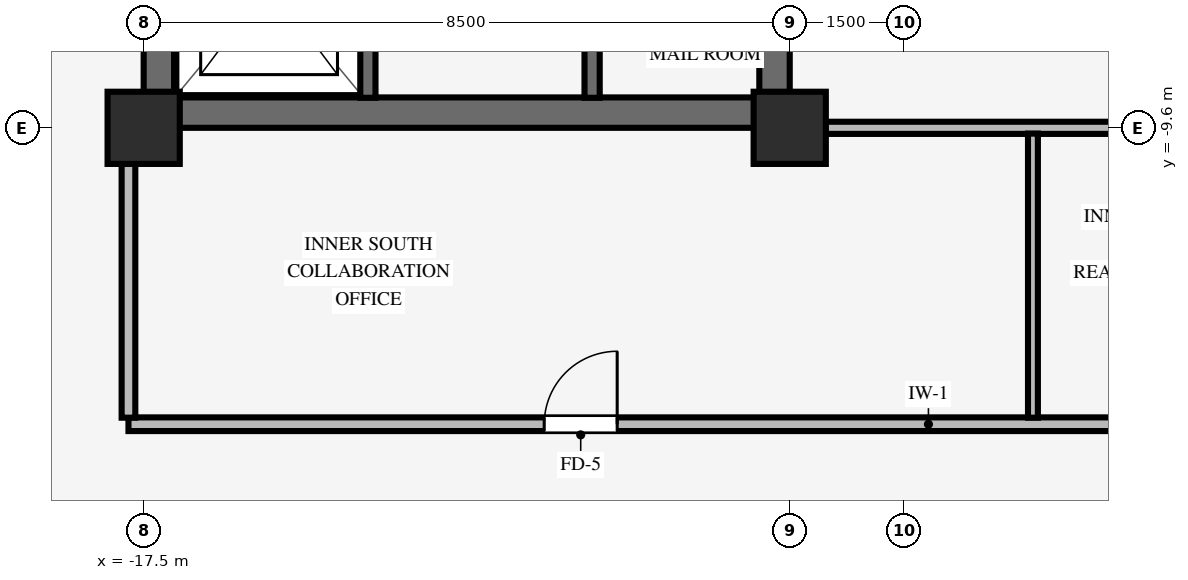
"""IFC4 building model, lengths in metres.
Left out: names, types, materials, properties, quantities, classifications, styles, units other than length and angle.
Written with IfcOpenShell. Run it as: python <this file> out.ifc"""

import sys

from ifc_helpers import new_model, si_unit, direction, frame, frame_2d, origin, origin_2d, place, context, subcontext, project, spatial, rectangle, extrude, source, transform, mapped, element, fill, save


model = new_model("IFC4")
c1 = context("Model", 3, precision=1e-05, world=origin(), true_north=direction((0.0, 1.0)))
c2 = subcontext(c1, "Body", "Model", "MODEL_VIEW")
j1 = project(units=[si_unit("LENGTHUNIT", "METRE"), si_unit("PLANEANGLEUNIT", "RADIAN")], contexts=[c1])
p1 = place(None, origin())
s1 = spatial("IfcSite", under=j1, at=p1, CompositionType="ELEMENT")
p2 = place(p1, origin())
s2 = spatial("IfcBuilding", under=s1, at=p2, CompositionType="ELEMENT")
p3 = place(p2, frame((0.0, 0.0, 153.05)))
s3 = spatial("IfcBuildingStorey", under=s2, at=p3, CompositionType="ELEMENT", Elevation=153.05)
p4 = place(p3, frame((-17.5, -9.4, 0.0), z_axis=(0.0, 0.0, 1.0), x_axis=(1.0, 0.0, 0.0)))
e1 = element("IfcWall", 1, at=p4, inside=s3, PredefinedType="SHEAR", context=c2, shape_type="SweptSolid", body=[
    extrude(rectangle(XDim=8.5, YDim=0.4, at=frame_2d((4.25, 0.0))), origin(), (0.0, 0.0, 1.0), 3.37),
])
p5 = place(p3, frame((-17.3, -9.205, 0.0), z_axis=(0.0, 0.0, 1.0), x_axis=(0.0, 1.0, 0.0)))
e2 = element("IfcWall", 2, at=p5, inside=s3, PredefinedType="SHEAR", context=c2, shape_type="SweptSolid", body=[
    extrude(rectangle(XDim=18.41, YDim=0.4, at=frame_2d((9.205, 0.0))), origin(), (0.0, 0.0, 1.0), 3.37),
])
p6 = place(p3, frame((-9.2, -9.205, 0.0), z_axis=(0.0, 0.0, 1.0), x_axis=(0.0, 1.0, 0.0)))
e3 = element("IfcWall", 3, at=p6, inside=s3, PredefinedType="SHEAR", context=c2, shape_type="SweptSolid", body=[
    extrude(rectangle(XDim=18.41, YDim=0.4, at=frame_2d((9.205, 0.0))), origin(), (0.0, 0.0, 1.0), 3.37),
])
p7 = place(p6, frame((8.605, 0.0, 0.0)))
e4 = element("IfcOpeningElement", 4, at=p7, cuts=e3, PredefinedType="OPENING", context=c2, shape_type="SweptSolid", body=[
    extrude(rectangle(XDim=1.2, YDim=2.15, at=frame_2d((0.6, 1.075))), frame((0.0, 0.21, 0.0), z_axis=(0.0, -1.0, 0.0), x_axis=(1.0, 0.0, 0.0)), (0.0, 0.0, 1.0), 0.42),
])
for number, where, z_axis, x_axis in (
    (5, (-17.5, -9.6, 0.0), (0.0, 0.0, 1.0), (1.0, 0.0, 0.0)),
    (6, (-9.0, -9.6, 0.0), (0.0, 0.0, 1.0), (1.0, 0.0, 0.0)),
):
    element("IfcColumn", number, at=place(p3, frame(where, z_axis=z_axis, x_axis=x_axis)), inside=s3, PredefinedType="COLUMN", context=c2, shape_type="SweptSolid", body=[
        extrude(rectangle(XDim=0.95, YDim=0.95, at=origin_2d()), origin(), (0.0, 0.0, 1.0), 3.37),
    ])
p8 = place(p3, frame((-14.55, -9.205, 0.0), z_axis=(0.0, 0.0, 1.0), x_axis=(0.0, 1.0, 0.0)))
e7 = element("IfcWall", 7, at=p8, inside=s3, PredefinedType="SHEAR", context=c2, shape_type="SweptSolid", body=[
    extrude(rectangle(XDim=3.01, YDim=0.2, at=frame_2d((1.505, 0.0))), origin(), (0.0, 0.0, 1.0), 3.37),
])
p9 = place(p8, frame((0.93, 0.0, 0.0)))
e8 = element("IfcOpeningElement", 8, at=p9, cuts=e7, PredefinedType="OPENING", context=c2, shape_type="SweptSolid", body=[
    extrude(rectangle(XDim=1.15, YDim=2.15, at=frame_2d((0.575, 1.075))), frame((0.0, 0.11, 0.0), z_axis=(0.0, -1.0, 0.0), x_axis=(1.0, 0.0, 0.0)), (0.0, 0.0, 1.0), 0.22),
])
p10 = place(p3, frame((-11.6, -9.205, 0.0), z_axis=(0.0, 0.0, 1.0), x_axis=(0.0, 1.0, 0.0)))
e9 = element("IfcWall", 9, at=p10, inside=s3, PredefinedType="SHEAR", context=c2, shape_type="SweptSolid", body=[
    extrude(rectangle(XDim=7.975, YDim=0.2, at=frame_2d((3.988, 0.0))), origin(), (0.0, 0.0, 1.0), 3.37),
])
p11 = place(p10, frame((1.265, 0.0, 0.0)))
e10 = element("IfcOpeningElement", 10, at=p11, cuts=e9, PredefinedType="OPENING", context=c2, shape_type="SweptSolid", body=[
    extrude(rectangle(XDim=0.88, YDim=2.1, at=frame_2d((0.44, 1.05))), frame((0.0, 0.11, 0.0), z_axis=(0.0, -1.0, 0.0), x_axis=(1.0, 0.0, 0.0)), (0.0, 0.0, 1.0), 0.22),
])
p12 = place(p10, frame((5.565, 0.0, 0.0)))
e11 = element("IfcOpeningElement", 11, at=p12, cuts=e9, PredefinedType="OPENING", context=c2, shape_type="SweptSolid", body=[
    extrude(rectangle(XDim=0.88, YDim=2.1, at=frame_2d((0.44, 1.05))), frame((0.0, 0.11, 0.0), z_axis=(0.0, -1.0, 0.0), x_axis=(1.0, 0.0, 0.0)), (0.0, 0.0, 1.0), 0.22),
])
p13 = place(p3, frame((-17.7, -13.5, 0.0), z_axis=(0.0, 0.0, 1.0), x_axis=(1.0, 0.0, 0.0)))
e12 = element("IfcWall", 12, at=p13, inside=s3, PredefinedType="PARTITIONING", context=c2, shape_type="SweptSolid", body=[
    extrude(rectangle(XDim=24.3, YDim=0.18, at=frame_2d((12.15, 0.0))), origin(), (0.0, 0.0, 1.0), 2.998),
])
p14 = place(p13, frame((5.47, 0.0, 0.0)))
e13 = element("IfcOpeningElement", 13, at=p14, cuts=e12, PredefinedType="OPENING", context=c2, shape_type="SweptSolid", body=[
    extrude(rectangle(XDim=0.96, YDim=2.1, at=frame_2d((0.48, 1.05))), frame((0.0, 0.1, 0.0), z_axis=(0.0, -1.0, 0.0), x_axis=(1.0, 0.0, 0.0)), (0.0, 0.0, 1.0), 0.2),
])
p15 = place(p13, frame((14.62, 0.0, 0.0)))
e14 = element("IfcOpeningElement", 14, at=p15, cuts=e12, PredefinedType="OPENING", context=c2, shape_type="SweptSolid", body=[
    extrude(rectangle(XDim=0.96, YDim=2.1, at=frame_2d((0.48, 1.05))), frame((0.0, 0.1, 0.0), z_axis=(0.0, -1.0, 0.0), x_axis=(1.0, 0.0, 0.0)), (0.0, 0.0, 1.0), 0.2),
])
p16 = place(p13, frame((18.9, 0.0, 0.0)))
e15 = element("IfcOpeningElement", 15, at=p16, cuts=e12, PredefinedType="OPENING", context=c2, shape_type="SweptSolid", body=[
    extrude(rectangle(XDim=0.9, YDim=2.1, at=frame_2d((0.45, 1.05))), frame((0.0, 0.1, 0.0), z_axis=(0.0, -1.0, 0.0), x_axis=(1.0, 0.0, 0.0)), (0.0, 0.0, 1.0), 0.2),
])
p17 = place(p13, frame((21.0, 0.0, 0.0)))
e16 = element("IfcOpeningElement", 16, at=p17, cuts=e12, PredefinedType="OPENING", context=c2, shape_type="SweptSolid", body=[
    extrude(rectangle(XDim=0.9, YDim=2.1, at=frame_2d((0.45, 1.05))), frame((0.0, 0.1, 0.0), z_axis=(0.0, -1.0, 0.0), x_axis=(1.0, 0.0, 0.0)), (0.0, 0.0, 1.0), 0.2),
])
p18 = place(p3, frame((-8.529, -9.6, 0.0), z_axis=(0.0, 0.0, 1.0), x_axis=(1.0, 0.0, 0.0)))
e17 = element("IfcWall", 17, at=p18, inside=s3, PredefinedType="PARTITIONING", context=c2, shape_type="SweptSolid", body=[
    extrude(rectangle(XDim=8.353, YDim=0.16, at=frame_2d((4.177, 0.0))), origin(), (0.0, 0.0, 1.0), 2.405),
])
p19 = place(p3, frame((-17.7, -13.414, 0.0), z_axis=(0.0, 0.0, 1.0), x_axis=(0.0, 1.0, 0.0)))
e18 = element("IfcWall", 18, at=p19, inside=s3, PredefinedType="PARTITIONING", context=c2, shape_type="SweptSolid", body=[
    extrude(rectangle(XDim=3.343, YDim=0.18, at=frame_2d((1.671, 0.0))), origin(), (0.0, 0.0, 1.0), 2.816),
])
p20 = place(p3, frame((-5.8, -13.414, 0.0), z_axis=(0.0, 0.0, 1.0), x_axis=(0.0, 1.0, 0.0)))
e19 = element("IfcWall", 19, at=p20, inside=s3, PredefinedType="PARTITIONING", context=c2, shape_type="SweptSolid", body=[
    extrude(rectangle(XDim=3.738, YDim=0.13, at=frame_2d((1.869, 0.0))), origin(), (0.0, 0.0, 1.0), 3.36),
])
m1 = source(origin(), c2, "Body", "SweptSolid", [
    extrude(rectangle(XDim=0.96, YDim=2.1, at=frame_2d((0.48, 1.05))), frame((0.0, 0.025, 0.0), z_axis=(0.0, -1.0, 0.0), x_axis=(1.0, 0.0, 0.0)), (0.0, 0.0, 1.0), 0.05),
])
p21 = place(p14, origin())
e20 = element("IfcDoor", 20, at=p21, inside=s3, OperationType="SINGLE_SWING_RIGHT", PredefinedType="DOOR", context=c2, shape_type="MappedRepresentation", body=[
    mapped(m1, transform((0.0, 0.0, 0.0), scale=1.0)),
])
fill(e13, e20)
save(model, sys.argv[1])
